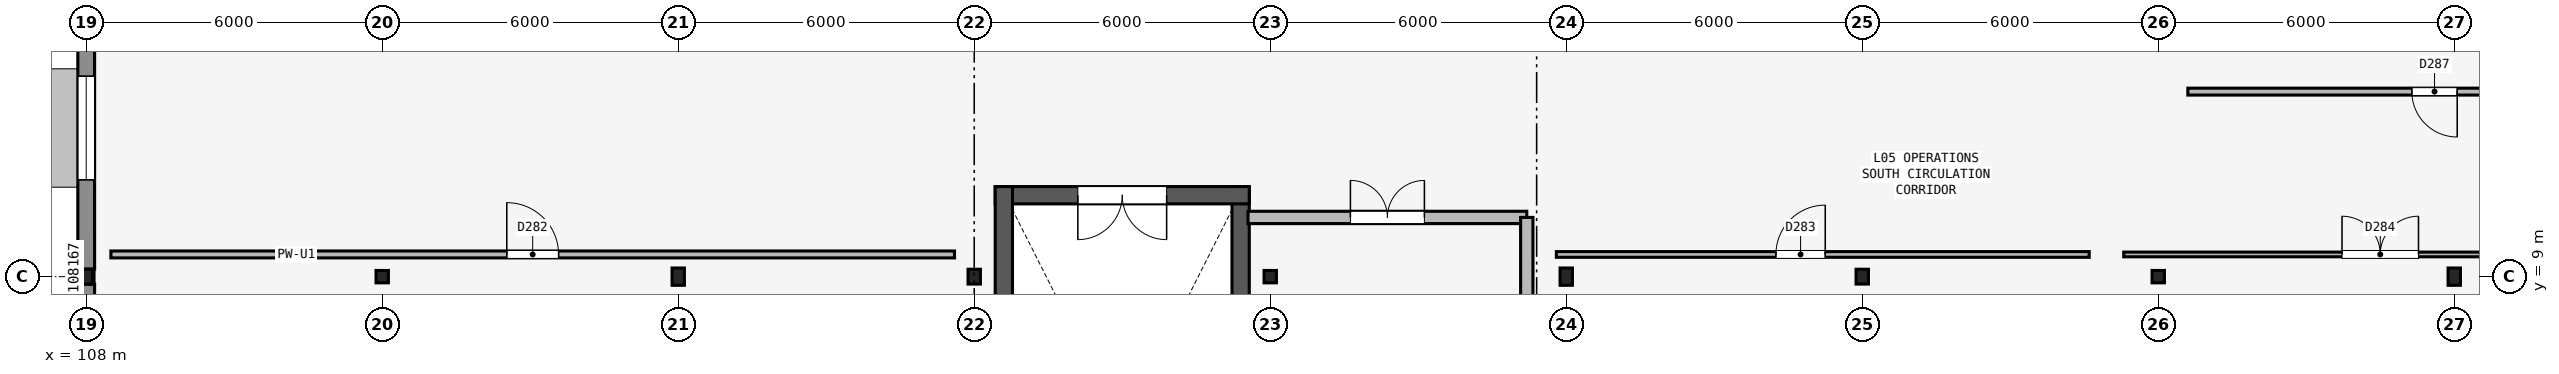
"""IFC4 building model, lengths in metres.
Left out: names, types, materials, properties, quantities, classifications, styles, units other than length and angle.
Written with IfcOpenShell. Run it as: python <this file> out.ifc"""

import sys

from ifc_helpers import new_model, si_unit, direction, frame, frame_2d, origin, origin_2d, place, context, subcontext, project, spatial, rectangle, hollow_rectangle, i_section, extrude, element, fill, save


model = new_model("IFC4")
c1 = context("Model", 3, precision=1e-05, world=origin(), true_north=direction((0.0, 1.0)))
c2 = subcontext(c1, "Body", "Model", "MODEL_VIEW")
j1 = project(units=[si_unit("LENGTHUNIT", "METRE"), si_unit("PLANEANGLEUNIT", "RADIAN")], contexts=[c1])
p1 = place(None, origin())
s1 = spatial("IfcSite", under=j1, at=p1, CompositionType="ELEMENT")
p2 = place(p1, origin())
s2 = spatial("IfcBuilding", under=s1, at=p2, CompositionType="ELEMENT")
p3 = place(p2, frame((0.0, 0.0, 22.2)))
s3 = spatial("IfcBuildingStorey", under=s2, at=p3, CompositionType="ELEMENT", Elevation=22.2)
p4 = place(p3, frame((108.0, 9.0, 0.0), z_axis=(0.0, 0.0, 1.0), x_axis=(1.0, 0.0, 0.0)))
e1 = element("IfcColumn", 1, at=p4, inside=s3, PredefinedType="COLUMN", context=c2, shape_type="SweptSolid", body=[
    extrude(i_section(OverallWidth=0.25, OverallDepth=0.3, WebThickness=0.01, FlangeThickness=0.01, FilletRadius=0.012, at=origin_2d()), origin(), (0.0, 0.0, 1.0), 3.9),
])
p5 = place(p3, frame((114.0, 9.0, 0.0), z_axis=(0.0, 0.0, 1.0), x_axis=(1.0, 0.0, 0.0)))
e2 = element("IfcColumn", 2, at=p5, inside=s3, PredefinedType="COLUMN", context=c2, shape_type="SweptSolid", body=[
    extrude(hollow_rectangle(XDim=0.25, YDim=0.25, WallThickness=0.012, InnerFilletRadius=0.012, OuterFilletRadius=0.024, at=origin_2d()), origin(), (0.0, 0.0, 1.0), 3.9),
])
p6 = place(p3, frame((120.0, 9.0, 0.0), z_axis=(0.0, 0.0, 1.0), x_axis=(1.0, 0.0, 0.0)))
e3 = element("IfcColumn", 3, at=p6, inside=s3, PredefinedType="COLUMN", context=c2, shape_type="SweptSolid", body=[
    extrude(i_section(OverallWidth=0.25, OverallDepth=0.35, WebThickness=0.01, FlangeThickness=0.012, FilletRadius=0.012, at=origin_2d()), origin(), (0.0, 0.0, 1.0), 3.9),
])
p7 = place(p3, frame((126.0, 9.0, 0.0), z_axis=(0.0, 0.0, 1.0), x_axis=(1.0, 0.0, 0.0)))
e4 = element("IfcColumn", 4, at=p7, inside=s3, PredefinedType="COLUMN", context=c2, shape_type="SweptSolid", body=[
    extrude(i_section(OverallWidth=0.25, OverallDepth=0.3, WebThickness=0.01, FlangeThickness=0.01, FilletRadius=0.012, at=origin_2d()), origin(), (0.0, 0.0, 1.0), 3.9),
])
p8 = place(p3, frame((132.0, 9.0, 0.0), z_axis=(0.0, 0.0, 1.0), x_axis=(1.0, 0.0, 0.0)))
e5 = element("IfcColumn", 5, at=p8, inside=s3, PredefinedType="COLUMN", context=c2, shape_type="SweptSolid", body=[
    extrude(hollow_rectangle(XDim=0.25, YDim=0.25, WallThickness=0.012, InnerFilletRadius=0.012, OuterFilletRadius=0.024, at=origin_2d()), origin(), (0.0, 0.0, 1.0), 3.9),
])
p9 = place(p3, frame((138.0, 9.0, 0.0), z_axis=(0.0, 0.0, 1.0), x_axis=(1.0, 0.0, 0.0)))
e6 = element("IfcColumn", 6, at=p9, inside=s3, PredefinedType="COLUMN", context=c2, shape_type="SweptSolid", body=[
    extrude(i_section(OverallWidth=0.25, OverallDepth=0.35, WebThickness=0.01, FlangeThickness=0.012, FilletRadius=0.012, at=origin_2d()), origin(), (0.0, 0.0, 1.0), 3.9),
])
p10 = place(p3, frame((144.0, 9.0, 0.0), z_axis=(0.0, 0.0, 1.0), x_axis=(1.0, 0.0, 0.0)))
e7 = element("IfcColumn", 7, at=p10, inside=s3, PredefinedType="COLUMN", context=c2, shape_type="SweptSolid", body=[
    extrude(i_section(OverallWidth=0.25, OverallDepth=0.3, WebThickness=0.01, FlangeThickness=0.01, FilletRadius=0.012, at=origin_2d()), origin(), (0.0, 0.0, 1.0), 3.9),
])
p11 = place(p3, frame((150.0, 9.0, 0.0), z_axis=(0.0, 0.0, 1.0), x_axis=(1.0, 0.0, 0.0)))
e8 = element("IfcColumn", 8, at=p11, inside=s3, PredefinedType="COLUMN", context=c2, shape_type="SweptSolid", body=[
    extrude(hollow_rectangle(XDim=0.25, YDim=0.25, WallThickness=0.012, InnerFilletRadius=0.012, OuterFilletRadius=0.024, at=origin_2d()), origin(), (0.0, 0.0, 1.0), 3.9),
])
p12 = place(p3, frame((156.0, 9.0, 0.0), z_axis=(0.0, 0.0, 1.0), x_axis=(1.0, 0.0, 0.0)))
e9 = element("IfcColumn", 9, at=p12, inside=s3, PredefinedType="COLUMN", context=c2, shape_type="SweptSolid", body=[
    extrude(i_section(OverallWidth=0.25, OverallDepth=0.35, WebThickness=0.01, FlangeThickness=0.012, FilletRadius=0.012, at=origin_2d()), origin(), (0.0, 0.0, 1.0), 3.9),
])
p13 = place(p3, frame((108.0, 6.8, 0.0), z_axis=(0.0, 0.0, 1.0), x_axis=(0.0, 1.0, 0.0)))
e10 = element("IfcWall", 10, at=p13, inside=s3, PredefinedType="SOLIDWALL", context=c2, shape_type="SweptSolid", body=[
    extrude(rectangle(XDim=2.046, YDim=0.34, at=frame_2d((1.023, 0.0))), origin(), (0.0, 0.0, 1.0), 3.08),
])
p14 = place(p3, frame((108.0, 9.154, 0.0), z_axis=(0.0, 0.0, 1.0), x_axis=(0.0, 1.0, 0.0)))
e11 = element("IfcWall", 11, at=p14, inside=s3, PredefinedType="SOLIDWALL", context=c2, shape_type="SweptSolid", body=[
    extrude(rectangle(XDim=5.717, YDim=0.34, at=frame_2d((2.858, 0.0))), origin(), (0.0, 0.0, 1.0), 3.08),
])
p15 = place(p14, frame((1.809, 0.0, 0.9)))
e12 = element("IfcOpeningElement", 12, at=p15, cuts=e11, PredefinedType="OPENING", context=c2, shape_type="SweptSolid", body=[
    extrude(rectangle(XDim=2.1, YDim=1.5, at=frame_2d((1.05, 0.75))), frame((0.0, 0.18, 0.0), z_axis=(0.0, -1.0, 0.0), x_axis=(1.0, 0.0, 0.0)), (0.0, 0.0, 1.0), 0.36),
])
p16 = place(p3, frame((131.4, 1.075, 0.0), z_axis=(0.0, 0.0, 1.0), x_axis=(0.0, 1.0, 0.0)))
e13 = element("IfcWall", 13, at=p16, inside=s3, PredefinedType="SHEAR", context=c2, shape_type="SweptSolid", body=[
    extrude(rectangle(XDim=9.75, YDim=0.35, at=frame_2d((4.875, 0.0))), origin(), (0.0, 0.0, 1.0), 3.76),
])
p17 = place(p3, frame((131.575, 10.65, 0.0), z_axis=(0.0, 0.0, 1.0), x_axis=(-1.0, 0.0, 0.0)))
e14 = element("IfcWall", 14, at=p17, inside=s3, PredefinedType="SHEAR", context=c2, shape_type="SweptSolid", body=[
    extrude(rectangle(XDim=5.15, YDim=0.35, at=frame_2d((2.575, 0.0))), origin(), (0.0, 0.0, 1.0), 3.76),
])
p18 = place(p17, frame((1.675, 0.0, 0.0)))
e15 = element("IfcOpeningElement", 15, at=p18, cuts=e14, PredefinedType="OPENING", context=c2, shape_type="SweptSolid", body=[
    extrude(rectangle(XDim=1.8, YDim=2.2, at=frame_2d((0.9, 1.1))), frame((0.0, 0.185, 0.0), z_axis=(0.0, -1.0, 0.0), x_axis=(1.0, 0.0, 0.0)), (0.0, 0.0, 1.0), 0.37),
])
p19 = place(p3, frame((126.6, 10.825, 0.0), z_axis=(0.0, 0.0, 1.0), x_axis=(0.0, -1.0, 0.0)))
e16 = element("IfcWall", 16, at=p19, inside=s3, PredefinedType="SHEAR", context=c2, shape_type="SweptSolid", body=[
    extrude(rectangle(XDim=9.75, YDim=0.35, at=frame_2d((4.875, 0.0))), origin(), (0.0, 0.0, 1.0), 3.76),
])
p20 = place(p3, frame((131.55, 10.2, 0.0), z_axis=(0.0, 0.0, 1.0), x_axis=(1.0, 0.0, 0.0)))
e17 = element("IfcWall", 17, at=p20, inside=s3, PredefinedType="PARTITIONING", context=c2, shape_type="SweptSolid", body=[
    extrude(rectangle(XDim=5.65, YDim=0.25, at=frame_2d((2.825, 0.0))), origin(), (0.0, 0.0, 1.0), 3.28),
])
p21 = place(p20, frame((2.075, 0.0, 0.0)))
e18 = element("IfcOpeningElement", 18, at=p21, cuts=e17, PredefinedType="OPENING", context=c2, shape_type="SweptSolid", body=[
    extrude(rectangle(XDim=1.5, YDim=2.15, at=frame_2d((0.75, 1.075))), frame((0.0, 0.135, 0.0), z_axis=(0.0, -1.0, 0.0), x_axis=(1.0, 0.0, 0.0)), (0.0, 0.0, 1.0), 0.27),
])
p22 = place(p3, frame((137.2, 5.8, 0.0), z_axis=(0.0, 0.0, 1.0), x_axis=(0.0, 1.0, 0.0)))
e19 = element("IfcWall", 19, at=p22, inside=s3, PredefinedType="PARTITIONING", context=c2, shape_type="SweptSolid", body=[
    extrude(rectangle(XDim=4.4, YDim=0.25, at=frame_2d((2.2, 0.0))), origin(), (0.0, 0.0, 1.0), 3.23),
])
p23 = place(p3, frame((108.5, 9.45, 0.0), z_axis=(0.0, 0.0, 1.0), x_axis=(1.0, 0.0, 0.0)))
e20 = element("IfcWall", 20, at=p23, inside=s3, PredefinedType="PARTITIONING", context=c2, shape_type="SweptSolid", body=[
    extrude(rectangle(XDim=17.1, YDim=0.14, at=frame_2d((8.55, 0.0))), origin(), (0.0, 0.0, 1.0), 3.28),
])
p24 = place(p23, frame((8.025, 0.0, 0.0)))
e21 = element("IfcOpeningElement", 21, at=p24, cuts=e20, PredefinedType="OPENING", context=c2, shape_type="SweptSolid", body=[
    extrude(rectangle(XDim=1.05, YDim=2.2, at=frame_2d((0.525, 1.1))), frame((0.0, 0.08, 0.0), z_axis=(0.0, -1.0, 0.0), x_axis=(1.0, 0.0, 0.0)), (0.0, 0.0, 1.0), 0.16),
])
p25 = place(p3, frame((137.8, 9.45, 0.0), z_axis=(0.0, 0.0, 1.0), x_axis=(1.0, 0.0, 0.0)))
e22 = element("IfcWall", 22, at=p25, inside=s3, PredefinedType="PARTITIONING", context=c2, shape_type="SweptSolid", body=[
    extrude(rectangle(XDim=10.8, YDim=0.115, at=frame_2d((5.4, 0.0))), origin(), (0.0, 0.0, 1.0), 3.28),
])
p26 = place(p25, frame((4.45, 0.0, 0.0)))
e23 = element("IfcOpeningElement", 23, at=p26, cuts=e22, PredefinedType="OPENING", context=c2, shape_type="SweptSolid", body=[
    extrude(rectangle(XDim=1.0, YDim=2.15, at=frame_2d((0.5, 1.075))), frame((0.0, 0.067, 0.0), z_axis=(0.0, -1.0, 0.0), x_axis=(1.0, 0.0, 0.0)), (0.0, 0.0, 1.0), 0.135),
])
p27 = place(p3, frame((149.3, 9.45, 0.0), z_axis=(0.0, 0.0, 1.0), x_axis=(1.0, 0.0, 0.0)))
e24 = element("IfcWall", 24, at=p27, inside=s3, PredefinedType="PARTITIONING", context=c2, shape_type="SweptSolid", body=[
    extrude(rectangle(XDim=11.3, YDim=0.095, at=frame_2d((5.65, 0.0))), origin(), (0.0, 0.0, 1.0), 3.28),
])
p28 = place(p27, frame((4.425, 0.0, 0.0)))
e25 = element("IfcOpeningElement", 25, at=p28, cuts=e24, PredefinedType="OPENING", context=c2, shape_type="SweptSolid", body=[
    extrude(rectangle(XDim=1.55, YDim=2.2, at=frame_2d((0.775, 1.1))), frame((0.0, 0.057, 0.0), z_axis=(0.0, -1.0, 0.0), x_axis=(1.0, 0.0, 0.0)), (0.0, 0.0, 1.0), 0.115),
])
p29 = place(p3, frame((160.6, 12.75, 0.0), z_axis=(0.0, 0.0, 1.0), x_axis=(-1.0, 0.0, 0.0)))
e26 = element("IfcWall", 26, at=p29, inside=s3, PredefinedType="PARTITIONING", context=c2, shape_type="SweptSolid", body=[
    extrude(rectangle(XDim=10.0, YDim=0.14, at=frame_2d((5.0, 0.0))), origin(), (0.0, 0.0, 1.0), 3.28),
])
p30 = place(p29, frame((4.54, 0.0, 0.0)))
e27 = element("IfcOpeningElement", 27, at=p30, cuts=e26, PredefinedType="OPENING", context=c2, shape_type="SweptSolid", body=[
    extrude(rectangle(XDim=0.92, YDim=2.1, at=frame_2d((0.46, 1.05))), frame((0.0, 0.08, 0.0), z_axis=(0.0, -1.0, 0.0), x_axis=(1.0, 0.0, 0.0)), (0.0, 0.0, 1.0), 0.16),
])
p31 = place(p15, origin())
e28 = element("IfcWindow", 28, at=p31, inside=s3, PartitioningType="SINGLE_PANEL", PredefinedType="WINDOW", context=c2, shape_type="SweptSolid", body=[
    extrude(rectangle(XDim=2.1, YDim=1.5, at=frame_2d((1.05, 0.75))), frame((0.0, 0.03, 0.0), z_axis=(0.0, -1.0, 0.0), x_axis=(1.0, 0.0, 0.0)), (0.0, 0.0, 1.0), 0.06),
])
fill(e12, e28)
p32 = place(p18, origin())
e29 = element("IfcDoor", 29, at=p32, inside=s3, OperationType="DOUBLE_DOOR_SINGLE_SWING", PredefinedType="DOOR", context=c2, shape_type="SweptSolid", body=[
    extrude(rectangle(XDim=1.8, YDim=2.2, at=frame_2d((0.9, 1.1))), frame((0.0, 0.025, 0.0), z_axis=(0.0, -1.0, 0.0), x_axis=(1.0, 0.0, 0.0)), (0.0, 0.0, 1.0), 0.05),
])
fill(e15, e29)
p33 = place(p21, origin())
e30 = element("IfcDoor", 30, at=p33, inside=s3, OperationType="DOUBLE_DOOR_SINGLE_SWING", PredefinedType="DOOR", context=c2, shape_type="SweptSolid", body=[
    extrude(rectangle(XDim=1.5, YDim=2.15, at=frame_2d((0.75, 1.075))), frame((0.0, 0.025, 0.0), z_axis=(0.0, -1.0, 0.0), x_axis=(1.0, 0.0, 0.0)), (0.0, 0.0, 1.0), 0.05),
])
fill(e18, e30)
p34 = place(p24, origin())
e31 = element("IfcDoor", 31, at=p34, inside=s3, OperationType="SINGLE_SWING_LEFT", PredefinedType="DOOR", context=c2, shape_type="SweptSolid", body=[
    extrude(rectangle(XDim=1.05, YDim=2.2, at=frame_2d((0.525, 1.1))), frame((0.0, 0.025, 0.0), z_axis=(0.0, -1.0, 0.0), x_axis=(1.0, 0.0, 0.0)), (0.0, 0.0, 1.0), 0.05),
])
fill(e21, e31)
p35 = place(p26, origin())
e32 = element("IfcDoor", 32, at=p35, inside=s3, OperationType="SINGLE_SWING_RIGHT", PredefinedType="DOOR", context=c2, shape_type="SweptSolid", body=[
    extrude(rectangle(XDim=1.0, YDim=2.15, at=frame_2d((0.5, 1.075))), frame((0.0, 0.025, 0.0), z_axis=(0.0, -1.0, 0.0), x_axis=(1.0, 0.0, 0.0)), (0.0, 0.0, 1.0), 0.05),
])
fill(e23, e32)
p36 = place(p28, origin())
e33 = element("IfcDoor", 33, at=p36, inside=s3, OperationType="DOUBLE_DOOR_SINGLE_SWING", PredefinedType="DOOR", context=c2, shape_type="SweptSolid", body=[
    extrude(rectangle(XDim=1.55, YDim=2.2, at=frame_2d((0.775, 1.1))), frame((0.0, 0.025, 0.0), z_axis=(0.0, -1.0, 0.0), x_axis=(1.0, 0.0, 0.0)), (0.0, 0.0, 1.0), 0.05),
])
fill(e25, e33)
p37 = place(p30, origin())
e34 = element("IfcDoor", 34, at=p37, inside=s3, OperationType="SINGLE_SWING_LEFT", PredefinedType="DOOR", context=c2, shape_type="SweptSolid", body=[
    extrude(rectangle(XDim=0.92, YDim=2.1, at=frame_2d((0.46, 1.05))), frame((0.0, 0.025, 0.0), z_axis=(0.0, -1.0, 0.0), x_axis=(1.0, 0.0, 0.0)), (0.0, 0.0, 1.0), 0.05),
])
fill(e27, e34)
save(model, sys.argv[1])
